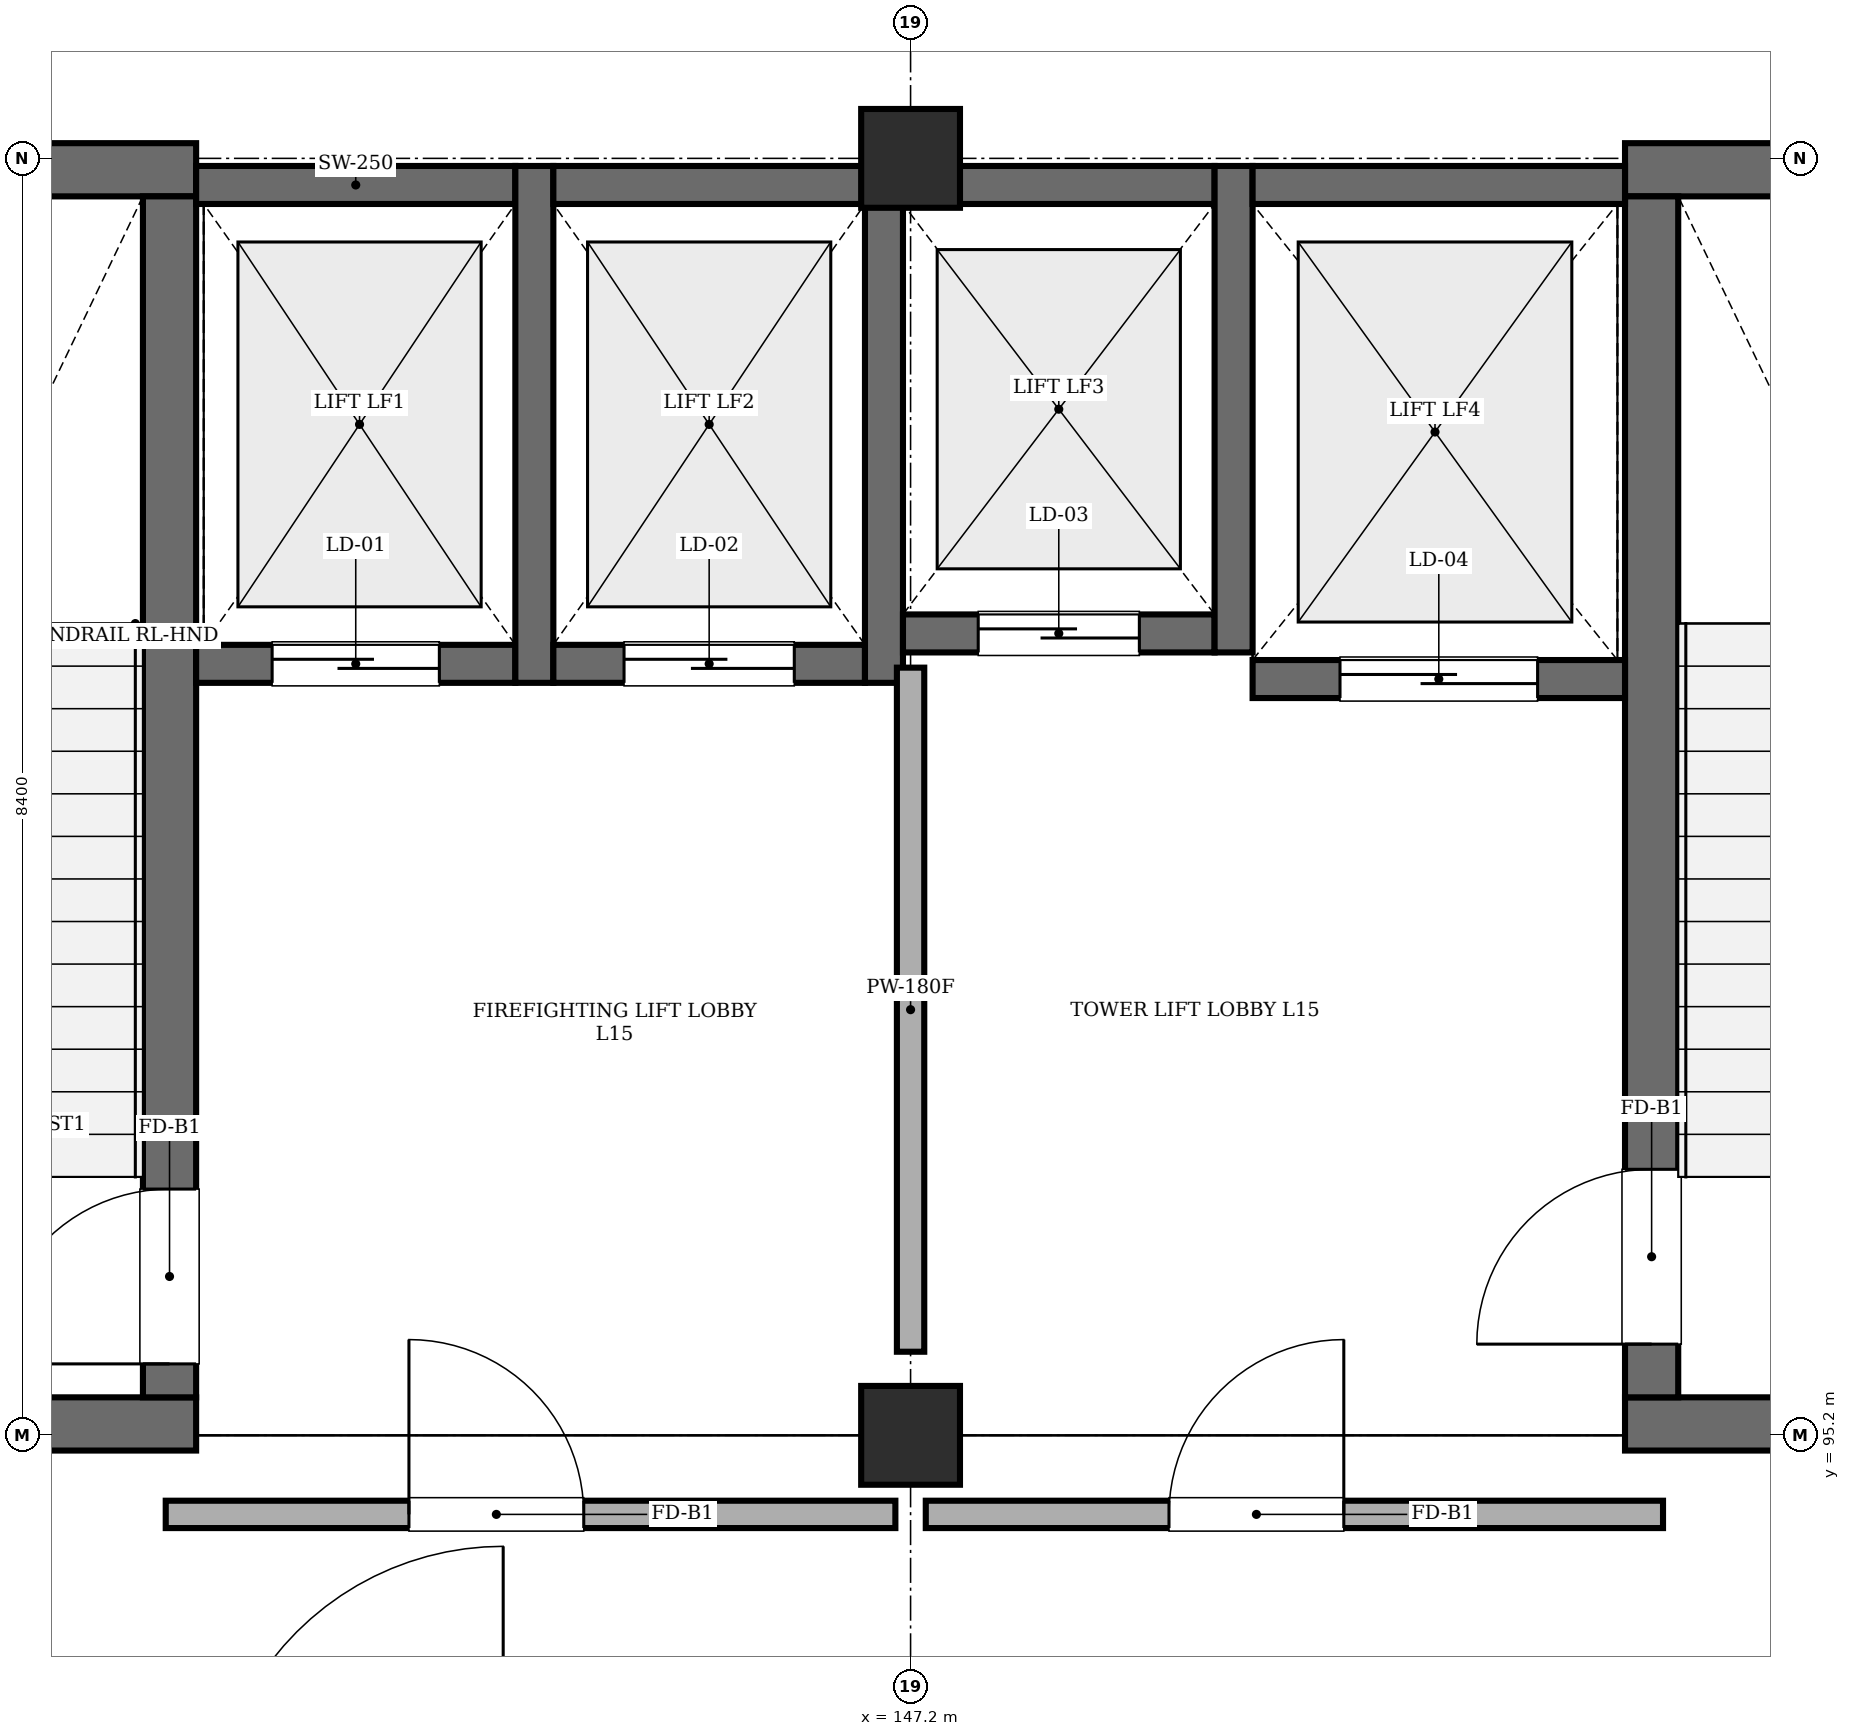
"""IFC4 building model, lengths in metres.
Left out: names, types, materials, properties, quantities, classifications, styles, units other than length and angle.
Written with IfcOpenShell. Run it as: python <this file> out.ifc"""

import sys

from ifc_helpers import new_model, si_unit, direction, frame, frame_2d, origin, origin_2d, place, context, subcontext, project, spatial, rectangle, extrude, element, fill, save


model = new_model("IFC4")
c1 = context("Model", 3, precision=1e-05, world=origin(), true_north=direction((0.0, 1.0)))
c2 = subcontext(c1, "Body", "Model", "MODEL_VIEW")
j1 = project(units=[si_unit("LENGTHUNIT", "METRE"), si_unit("PLANEANGLEUNIT", "RADIAN")], contexts=[c1])
p1 = place(None, origin())
s1 = spatial("IfcSite", under=j1, at=p1, CompositionType="ELEMENT")
p2 = place(p1, origin())
s2 = spatial("IfcBuilding", under=s1, at=p2, CompositionType="ELEMENT")
p3 = place(p2, frame((0.0, 0.0, 61.2)))
s3 = spatial("IfcBuildingStorey", under=s2, at=p3, CompositionType="ELEMENT", Elevation=61.2)
for number, where, z_axis, x_axis in (
    (1, (147.2, 95.2, 0.0), (0.0, 0.0, 1.0), (1.0, 0.0, 0.0)),
    (2, (147.2, 103.6, 0.0), (0.0, 0.0, 1.0), (1.0, 0.0, 0.0)),
):
    element("IfcColumn", number, at=place(p3, frame(where, z_axis=z_axis, x_axis=x_axis)), inside=s3, PredefinedType="COLUMN", context=c2, shape_type="SweptSolid", body=[
        extrude(rectangle(XDim=0.65, YDim=0.65, at=origin_2d()), origin(), (0.0, 0.0, 1.0), 4.28),
    ])
for number, where, z_axis, x_axis in (
    (3, (138.7, 95.275, 0.0), (0.0, 0.0, 1.0), (1.0, 0.0, 0.0)),
    (4, (138.7, 103.525, 0.0), (0.0, 0.0, 1.0), (1.0, 0.0, 0.0)),
):
    element("IfcWall", number, at=place(p3, frame(where, z_axis=z_axis, x_axis=x_axis)), inside=s3, PredefinedType="SHEAR", context=c2, shape_type="SweptSolid", body=[
        extrude(rectangle(XDim=3.8, YDim=0.35, at=frame_2d((1.9, 0.0))), origin(), (0.0, 0.0, 1.0), 4.28),
    ])
p4 = place(p3, frame((142.325, 95.45, 0.0), z_axis=(0.0, 0.0, 1.0), x_axis=(0.0, 1.0, 0.0)))
e5 = element("IfcWall", 5, at=p4, inside=s3, PredefinedType="SHEAR", context=c2, shape_type="SweptSolid", body=[
    extrude(rectangle(XDim=7.9, YDim=0.35, at=frame_2d((3.95, 0.0))), origin(), (0.0, 0.0, 1.0), 4.28),
])
p5 = place(p4, frame((0.22, 0.0, 0.0)))
e6 = element("IfcOpeningElement", 6, at=p5, cuts=e5, PredefinedType="OPENING", context=c2, shape_type="SweptSolid", body=[
    extrude(rectangle(XDim=1.15, YDim=2.15, at=frame_2d((0.575, 1.075))), frame((0.0, 0.185, 0.0), z_axis=(0.0, -1.0, 0.0), x_axis=(1.0, 0.0, 0.0)), (0.0, 0.0, 1.0), 0.37),
])
for number, where, z_axis, x_axis in (
    (7, (151.9, 95.275, 0.0), (0.0, 0.0, 1.0), (1.0, 0.0, 0.0)),
    (8, (151.9, 103.525, 0.0), (0.0, 0.0, 1.0), (1.0, 0.0, 0.0)),
):
    element("IfcWall", number, at=place(p3, frame(where, z_axis=z_axis, x_axis=x_axis)), inside=s3, PredefinedType="SHEAR", context=c2, shape_type="SweptSolid", body=[
        extrude(rectangle(XDim=3.8, YDim=0.35, at=frame_2d((1.9, 0.0))), origin(), (0.0, 0.0, 1.0), 4.28),
    ])
p6 = place(p3, frame((152.075, 95.45, 0.0), z_axis=(0.0, 0.0, 1.0), x_axis=(0.0, 1.0, 0.0)))
e9 = element("IfcWall", 9, at=p6, inside=s3, PredefinedType="SHEAR", context=c2, shape_type="SweptSolid", body=[
    extrude(rectangle(XDim=7.9, YDim=0.35, at=frame_2d((3.95, 0.0))), origin(), (0.0, 0.0, 1.0), 4.28),
])
p7 = place(p6, frame((0.35, 0.0, 0.0)))
e10 = element("IfcOpeningElement", 10, at=p7, cuts=e9, PredefinedType="OPENING", context=c2, shape_type="SweptSolid", body=[
    extrude(rectangle(XDim=1.15, YDim=2.15, at=frame_2d((0.575, 1.075))), frame((0.0, 0.185, 0.0), z_axis=(0.0, -1.0, 0.0), x_axis=(1.0, 0.0, 0.0)), (0.0, 0.0, 1.0), 0.37),
])
p8 = place(p3, frame((142.5, 100.275, 0.0), z_axis=(0.0, 0.0, 1.0), x_axis=(1.0, 0.0, 0.0)))
e11 = element("IfcWall", 11, at=p8, inside=s3, PredefinedType="SHEAR", context=c2, shape_type="SweptSolid", body=[
    extrude(rectangle(XDim=2.1, YDim=0.25, at=frame_2d((1.05, 0.0))), origin(), (0.0, 0.0, 1.0), 4.28),
])
p9 = place(p8, frame((0.5, 0.0, 0.0)))
e12 = element("IfcOpeningElement", 12, at=p9, cuts=e11, PredefinedType="OPENING", context=c2, shape_type="SweptSolid", body=[
    extrude(rectangle(XDim=1.1, YDim=2.15, at=frame_2d((0.55, 1.075))), frame((0.0, 0.135, 0.0), z_axis=(0.0, -1.0, 0.0), x_axis=(1.0, 0.0, 0.0)), (0.0, 0.0, 1.0), 0.27),
])
p10 = place(p3, frame((142.5, 103.425, 0.0), z_axis=(0.0, 0.0, 1.0), x_axis=(1.0, 0.0, 0.0)))
e13 = element("IfcWall", 13, at=p10, inside=s3, PredefinedType="SHEAR", context=c2, shape_type="SweptSolid", body=[
    extrude(rectangle(XDim=2.1, YDim=0.25, at=frame_2d((1.05, 0.0))), origin(), (0.0, 0.0, 1.0), 4.28),
])
p11 = place(p3, frame((144.725, 100.15, 0.0), z_axis=(0.0, 0.0, 1.0), x_axis=(0.0, 1.0, 0.0)))
e14 = element("IfcWall", 14, at=p11, inside=s3, PredefinedType="SHEAR", context=c2, shape_type="SweptSolid", body=[
    extrude(rectangle(XDim=3.4, YDim=0.25, at=frame_2d((1.7, 0.0))), origin(), (0.0, 0.0, 1.0), 4.28),
])
p12 = place(p3, frame((144.85, 100.275, 0.0), z_axis=(0.0, 0.0, 1.0), x_axis=(1.0, 0.0, 0.0)))
e15 = element("IfcWall", 15, at=p12, inside=s3, PredefinedType="SHEAR", context=c2, shape_type="SweptSolid", body=[
    extrude(rectangle(XDim=2.05, YDim=0.25, at=frame_2d((1.025, 0.0))), origin(), (0.0, 0.0, 1.0), 4.28),
])
p13 = place(p12, frame((0.465, 0.0, 0.0)))
e16 = element("IfcOpeningElement", 16, at=p13, cuts=e15, PredefinedType="OPENING", context=c2, shape_type="SweptSolid", body=[
    extrude(rectangle(XDim=1.12, YDim=2.15, at=frame_2d((0.56, 1.075))), frame((0.0, 0.135, 0.0), z_axis=(0.0, -1.0, 0.0), x_axis=(1.0, 0.0, 0.0)), (0.0, 0.0, 1.0), 0.27),
])
p14 = place(p3, frame((144.85, 103.425, 0.0), z_axis=(0.0, 0.0, 1.0), x_axis=(1.0, 0.0, 0.0)))
e17 = element("IfcWall", 17, at=p14, inside=s3, PredefinedType="SHEAR", context=c2, shape_type="SweptSolid", body=[
    extrude(rectangle(XDim=2.05, YDim=0.25, at=frame_2d((1.025, 0.0))), origin(), (0.0, 0.0, 1.0), 4.28),
])
p15 = place(p3, frame((147.025, 100.15, 0.0), z_axis=(0.0, 0.0, 1.0), x_axis=(0.0, 1.0, 0.0)))
e18 = element("IfcWall", 18, at=p15, inside=s3, PredefinedType="SHEAR", context=c2, shape_type="SweptSolid", body=[
    extrude(rectangle(XDim=3.4, YDim=0.25, at=frame_2d((1.7, 0.0))), origin(), (0.0, 0.0, 1.0), 4.28),
])
p16 = place(p3, frame((147.15, 100.475, 0.0), z_axis=(0.0, 0.0, 1.0), x_axis=(1.0, 0.0, 0.0)))
e19 = element("IfcWall", 19, at=p16, inside=s3, PredefinedType="SHEAR", context=c2, shape_type="SweptSolid", body=[
    extrude(rectangle(XDim=2.05, YDim=0.25, at=frame_2d((1.025, 0.0))), origin(), (0.0, 0.0, 1.0), 4.28),
])
p17 = place(p16, frame((0.495, 0.0, 0.0)))
e20 = element("IfcOpeningElement", 20, at=p17, cuts=e19, PredefinedType="OPENING", context=c2, shape_type="SweptSolid", body=[
    extrude(rectangle(XDim=1.06, YDim=2.15, at=frame_2d((0.53, 1.075))), frame((0.0, 0.135, 0.0), z_axis=(0.0, -1.0, 0.0), x_axis=(1.0, 0.0, 0.0)), (0.0, 0.0, 1.0), 0.27),
])
p18 = place(p3, frame((147.15, 103.425, 0.0), z_axis=(0.0, 0.0, 1.0), x_axis=(1.0, 0.0, 0.0)))
e21 = element("IfcWall", 21, at=p18, inside=s3, PredefinedType="SHEAR", context=c2, shape_type="SweptSolid", body=[
    extrude(rectangle(XDim=2.05, YDim=0.25, at=frame_2d((1.025, 0.0))), origin(), (0.0, 0.0, 1.0), 4.28),
])
p19 = place(p3, frame((149.325, 100.35, 0.0), z_axis=(0.0, 0.0, 1.0), x_axis=(0.0, 1.0, 0.0)))
e22 = element("IfcWall", 22, at=p19, inside=s3, PredefinedType="SHEAR", context=c2, shape_type="SweptSolid", body=[
    extrude(rectangle(XDim=3.2, YDim=0.25, at=frame_2d((1.6, 0.0))), origin(), (0.0, 0.0, 1.0), 4.28),
])
p20 = place(p3, frame((149.45, 100.175, 0.0), z_axis=(0.0, 0.0, 1.0), x_axis=(1.0, 0.0, 0.0)))
e23 = element("IfcWall", 23, at=p20, inside=s3, PredefinedType="SHEAR", context=c2, shape_type="SweptSolid", body=[
    extrude(rectangle(XDim=2.45, YDim=0.25, at=frame_2d((1.225, 0.0))), origin(), (0.0, 0.0, 1.0), 4.28),
])
p21 = place(p20, frame((0.575, 0.0, 0.0)))
e24 = element("IfcOpeningElement", 24, at=p21, cuts=e23, PredefinedType="OPENING", context=c2, shape_type="SweptSolid", body=[
    extrude(rectangle(XDim=1.3, YDim=2.25, at=frame_2d((0.65, 1.125))), frame((0.0, 0.135, 0.0), z_axis=(0.0, -1.0, 0.0), x_axis=(1.0, 0.0, 0.0)), (0.0, 0.0, 1.0), 0.27),
])
p22 = place(p3, frame((149.45, 103.425, 0.0), z_axis=(0.0, 0.0, 1.0), x_axis=(1.0, 0.0, 0.0)))
e25 = element("IfcWall", 25, at=p22, inside=s3, PredefinedType="SHEAR", context=c2, shape_type="SweptSolid", body=[
    extrude(rectangle(XDim=2.45, YDim=0.25, at=frame_2d((1.225, 0.0))), origin(), (0.0, 0.0, 1.0), 4.28),
])
p23 = place(p3, frame((142.3, 94.68, 0.0), z_axis=(0.0, 0.0, 1.0), x_axis=(1.0, 0.0, 0.0)))
e26 = element("IfcWall", 26, at=p23, inside=s3, PredefinedType="STANDARD", context=c2, shape_type="SweptSolid", body=[
    extrude(rectangle(XDim=4.8, YDim=0.18, at=frame_2d((2.4, 0.0))), origin(), (0.0, 0.0, 1.0), 4.28),
])
p24 = place(p23, frame((1.6, 0.0, 0.0)))
e27 = element("IfcOpeningElement", 27, at=p24, cuts=e26, PredefinedType="OPENING", context=c2, shape_type="SweptSolid", body=[
    extrude(rectangle(XDim=1.15, YDim=2.15, at=frame_2d((0.575, 1.075))), frame((0.0, 0.1, 0.0), z_axis=(0.0, -1.0, 0.0), x_axis=(1.0, 0.0, 0.0)), (0.0, 0.0, 1.0), 0.2),
])
p25 = place(p3, frame((147.3, 94.68, 0.0), z_axis=(0.0, 0.0, 1.0), x_axis=(1.0, 0.0, 0.0)))
e28 = element("IfcWall", 28, at=p25, inside=s3, PredefinedType="STANDARD", context=c2, shape_type="SweptSolid", body=[
    extrude(rectangle(XDim=4.85, YDim=0.18, at=frame_2d((2.425, 0.0))), origin(), (0.0, 0.0, 1.0), 4.28),
])
p26 = place(p25, frame((1.6, 0.0, 0.0)))
e29 = element("IfcOpeningElement", 29, at=p26, cuts=e28, PredefinedType="OPENING", context=c2, shape_type="SweptSolid", body=[
    extrude(rectangle(XDim=1.15, YDim=2.15, at=frame_2d((0.575, 1.075))), frame((0.0, 0.1, 0.0), z_axis=(0.0, -1.0, 0.0), x_axis=(1.0, 0.0, 0.0)), (0.0, 0.0, 1.0), 0.2),
])
p27 = place(p3, frame((147.2, 95.75, 0.0), z_axis=(0.0, 0.0, 1.0), x_axis=(0.0, 1.0, 0.0)))
e30 = element("IfcWall", 30, at=p27, inside=s3, PredefinedType="STANDARD", context=c2, shape_type="SweptSolid", body=[
    extrude(rectangle(XDim=4.5, YDim=0.18, at=frame_2d((2.25, 0.0))), origin(), (0.0, 0.0, 1.0), 3.58),
])
p28 = place(p24, origin())
e31 = element("IfcDoor", 31, at=p28, inside=s3, OperationType="SINGLE_SWING_LEFT", PredefinedType="DOOR", context=c2, shape_type="SweptSolid", body=[
    extrude(rectangle(XDim=1.15, YDim=2.15, at=frame_2d((0.575, 1.075))), frame((0.0, 0.025, 0.0), z_axis=(0.0, -1.0, 0.0), x_axis=(1.0, 0.0, 0.0)), (0.0, 0.0, 1.0), 0.05),
])
fill(e27, e31)
p29 = place(p26, origin())
e32 = element("IfcDoor", 32, at=p29, inside=s3, OperationType="SINGLE_SWING_RIGHT", PredefinedType="DOOR", context=c2, shape_type="SweptSolid", body=[
    extrude(rectangle(XDim=1.15, YDim=2.15, at=frame_2d((0.575, 1.075))), frame((0.0, 0.025, 0.0), z_axis=(0.0, -1.0, 0.0), x_axis=(1.0, 0.0, 0.0)), (0.0, 0.0, 1.0), 0.05),
])
fill(e29, e32)
p30 = place(p5, origin())
e33 = element("IfcDoor", 33, at=p30, inside=s3, OperationType="SINGLE_SWING_LEFT", PredefinedType="DOOR", context=c2, shape_type="SweptSolid", body=[
    extrude(rectangle(XDim=1.15, YDim=2.15, at=frame_2d((0.575, 1.075))), frame((0.0, 0.025, 0.0), z_axis=(0.0, -1.0, 0.0), x_axis=(1.0, 0.0, 0.0)), (0.0, 0.0, 1.0), 0.05),
])
fill(e6, e33)
p31 = place(p7, origin())
e34 = element("IfcDoor", 34, at=p31, inside=s3, OperationType="SINGLE_SWING_LEFT", PredefinedType="DOOR", context=c2, shape_type="SweptSolid", body=[
    extrude(rectangle(XDim=1.15, YDim=2.15, at=frame_2d((0.575, 1.075))), frame((0.0, 0.025, 0.0), z_axis=(0.0, -1.0, 0.0), x_axis=(1.0, 0.0, 0.0)), (0.0, 0.0, 1.0), 0.05),
])
fill(e10, e34)
p32 = place(p9, origin())
e35 = element("IfcDoor", 35, at=p32, inside=s3, OperationType="SLIDING_TO_LEFT", PredefinedType="DOOR", context=c2, shape_type="SweptSolid", body=[
    extrude(rectangle(XDim=1.1, YDim=2.15, at=frame_2d((0.55, 1.075))), frame((0.0, 0.025, 0.0), z_axis=(0.0, -1.0, 0.0), x_axis=(1.0, 0.0, 0.0)), (0.0, 0.0, 1.0), 0.05),
])
fill(e12, e35)
p33 = place(p13, origin())
e36 = element("IfcDoor", 36, at=p33, inside=s3, OperationType="SLIDING_TO_LEFT", PredefinedType="DOOR", context=c2, shape_type="SweptSolid", body=[
    extrude(rectangle(XDim=1.12, YDim=2.15, at=frame_2d((0.56, 1.075))), frame((0.0, 0.025, 0.0), z_axis=(0.0, -1.0, 0.0), x_axis=(1.0, 0.0, 0.0)), (0.0, 0.0, 1.0), 0.05),
])
fill(e16, e36)
p34 = place(p17, origin())
e37 = element("IfcDoor", 37, at=p34, inside=s3, OperationType="SLIDING_TO_LEFT", PredefinedType="DOOR", context=c2, shape_type="SweptSolid", body=[
    extrude(rectangle(XDim=1.06, YDim=2.15, at=frame_2d((0.53, 1.075))), frame((0.0, 0.025, 0.0), z_axis=(0.0, -1.0, 0.0), x_axis=(1.0, 0.0, 0.0)), (0.0, 0.0, 1.0), 0.05),
])
fill(e20, e37)
p35 = place(p21, origin())
e38 = element("IfcDoor", 38, at=p35, inside=s3, OperationType="SLIDING_TO_LEFT", PredefinedType="DOOR", context=c2, shape_type="SweptSolid", body=[
    extrude(rectangle(XDim=1.3, YDim=2.25, at=frame_2d((0.65, 1.125))), frame((0.0, 0.025, 0.0), z_axis=(0.0, -1.0, 0.0), x_axis=(1.0, 0.0, 0.0)), (0.0, 0.0, 1.0), 0.05),
])
fill(e24, e38)
save(model, sys.argv[1])
